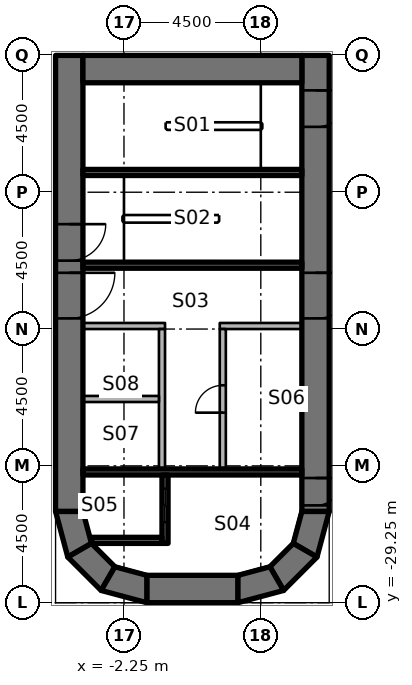
"""IFC4 building model, lengths in metres.
Left out: names, types, materials, properties, quantities, classifications, styles, units other than length and angle.
Written with IfcOpenShell. Run it as: python <this file> out.ifc"""

import sys

from ifc_helpers import new_model, si_unit, direction, frame, frame_2d, origin, place, context, subcontext, project, spatial, polyline, rectangle, outline, extrude, element, fill, save


model = new_model("IFC4")
c1 = context("Model", 3, precision=1e-05, world=origin(), true_north=direction((0.0, 1.0)))
c2 = subcontext(c1, "Body", "Model", "MODEL_VIEW")
j1 = project(units=[si_unit("LENGTHUNIT", "METRE"), si_unit("PLANEANGLEUNIT", "RADIAN")], contexts=[c1])
p1 = place(None, origin())
s1 = spatial("IfcSite", under=j1, at=p1, CompositionType="ELEMENT")
p2 = place(p1, origin())
s2 = spatial("IfcBuilding", under=s1, at=p2, CompositionType="ELEMENT")
p3 = place(p2, frame((0.0, 0.0, -4.0)))
s3 = spatial("IfcBuildingStorey", under=s2, at=p3, CompositionType="ELEMENT", Elevation=-4.0)
p4 = place(p3, frame((-4.05, -11.25, 0.0), z_axis=(0.0, 0.0, 1.0), x_axis=(0.0, -1.0, 0.0)))
e1 = element("IfcWall", 1, at=p4, inside=s3, PredefinedType="SHEAR", context=c2, shape_type="SweptSolid", body=[
    extrude(rectangle(XDim=15.0, YDim=0.9, at=frame_2d((7.5, 0.0))), origin(), (0.0, 0.0, 1.0), 4.0),
])
p5 = place(p4, frame((7.15, 0.0, 0.0)))
e2 = element("IfcOpeningElement", 2, at=p5, cuts=e1, PredefinedType="OPENING", context=c2, shape_type="SweptSolid", body=[
    extrude(rectangle(XDim=1.5, YDim=2.3, at=frame_2d((0.75, 1.15))), frame((0.0, 0.46, 0.0), z_axis=(0.0, -1.0, 0.0), x_axis=(1.0, 0.0, 0.0)), (0.0, 0.0, 1.0), 0.92),
])
p6 = place(p4, frame((5.55, 0.0, 0.0)))
e3 = element("IfcOpeningElement", 3, at=p6, cuts=e1, PredefinedType="OPENING", context=c2, shape_type="SweptSolid", body=[
    extrude(rectangle(XDim=1.2, YDim=2.1, at=frame_2d((0.6, 1.05))), frame((0.0, 0.46, 0.0), z_axis=(0.0, -1.0, 0.0), x_axis=(1.0, 0.0, 0.0)), (0.0, 0.0, 1.0), 0.92),
])
p7 = place(p3, frame((4.05, -11.25, 0.0), z_axis=(0.0, 0.0, 1.0), x_axis=(0.0, -1.0, 0.0)))
e4 = element("IfcWall", 4, at=p7, inside=s3, PredefinedType="SHEAR", context=c2, shape_type="SweptSolid", body=[
    extrude(rectangle(XDim=15.0, YDim=0.9, at=frame_2d((7.5, 0.0))), origin(), (0.0, 0.0, 1.0), 4.0),
])
p8 = place(p7, frame((7.15, 0.0, 0.0)))
e5 = element("IfcOpeningElement", 5, at=p8, cuts=e4, PredefinedType="OPENING", context=c2, shape_type="SweptSolid", body=[
    extrude(rectangle(XDim=1.5, YDim=2.3, at=frame_2d((0.75, 1.15))), frame((0.0, 0.46, 0.0), z_axis=(0.0, -1.0, 0.0), x_axis=(1.0, 0.0, 0.0)), (0.0, 0.0, 1.0), 0.92),
])
p9 = place(p7, frame((13.9, 0.0, 0.0)))
e6 = element("IfcOpeningElement", 6, at=p9, cuts=e4, PredefinedType="OPENING", context=c2, shape_type="SweptSolid", body=[
    extrude(rectangle(XDim=0.9, YDim=2.1, at=frame_2d((0.45, 1.05))), frame((0.0, 0.46, 0.0), z_axis=(0.0, -1.0, 0.0), x_axis=(1.0, 0.0, 0.0)), (0.0, 0.0, 1.0), 0.92),
])
p10 = place(p7, frame((1.15, 0.0, 0.0)))
e7 = element("IfcOpeningElement", 7, at=p10, cuts=e4, PredefinedType="OPENING", context=c2, shape_type="SweptSolid", body=[
    extrude(rectangle(XDim=1.2, YDim=2.1, at=frame_2d((0.6, 1.05))), frame((0.0, 0.46, 0.0), z_axis=(0.0, -1.0, 0.0), x_axis=(1.0, 0.0, 0.0)), (0.0, 0.0, 1.0), 0.92),
])
p11 = place(p3, frame((-3.6, -11.7, 0.0), z_axis=(0.0, 0.0, 1.0), x_axis=(1.0, 0.0, 0.0)))
e8 = element("IfcWall", 8, at=p11, inside=s3, PredefinedType="SHEAR", context=c2, shape_type="SweptSolid", body=[
    extrude(rectangle(XDim=7.2, YDim=0.9, at=frame_2d((3.6, 0.0))), origin(), (0.0, 0.0, 1.0), 4.0),
])
p12 = place(p3, frame((-1.5, -28.8, 0.0), z_axis=(0.0, 0.0, 1.0), x_axis=(1.0, 0.0, 0.0)))
e9 = element("IfcWall", 9, at=p12, inside=s3, PredefinedType="SHEAR", context=c2, shape_type="SweptSolid", body=[
    extrude(rectangle(XDim=3.0, YDim=0.9, at=frame_2d((1.5, 0.0))), origin(), (0.0, 0.0, 1.0), 4.0),
])
p13 = place(p3, origin())
e10 = element("IfcWall", 10, at=p13, inside=s3, PredefinedType="SHEAR", context=c2, shape_type="SweptSolid", body=[
    extrude(outline(polyline([(-4.5, -26.25), (-4.098, -27.75), (-3.319, -27.3), (-3.6, -26.25), (-4.5, -26.25)])), origin(), (0.0, 0.0, 1.0), 4.0),
])
p14 = place(p3, origin())
e11 = element("IfcWall", 11, at=p14, inside=s3, PredefinedType="SHEAR", context=c2, shape_type="SweptSolid", body=[
    extrude(outline(polyline([(-4.098, -27.75), (-3.0, -28.848), (-2.55, -28.069), (-3.319, -27.3), (-4.098, -27.75)])), origin(), (0.0, 0.0, 1.0), 4.0),
])
p15 = place(p3, origin())
e12 = element("IfcWall", 12, at=p15, inside=s3, PredefinedType="SHEAR", context=c2, shape_type="SweptSolid", body=[
    extrude(outline(polyline([(-3.0, -28.848), (-1.5, -29.25), (-1.5, -28.35), (-2.55, -28.069), (-3.0, -28.848)])), origin(), (0.0, 0.0, 1.0), 4.0),
])
p16 = place(p3, origin())
e13 = element("IfcWall", 13, at=p16, inside=s3, PredefinedType="SHEAR", context=c2, shape_type="SweptSolid", body=[
    extrude(outline(polyline([(4.5, -26.25), (4.098, -27.75), (3.319, -27.3), (3.6, -26.25), (4.5, -26.25)])), origin(), (0.0, 0.0, 1.0), 4.0),
])
p17 = place(p3, origin())
e14 = element("IfcWall", 14, at=p17, inside=s3, PredefinedType="SHEAR", context=c2, shape_type="SweptSolid", body=[
    extrude(outline(polyline([(4.098, -27.75), (3.0, -28.848), (2.55, -28.069), (3.319, -27.3), (4.098, -27.75)])), origin(), (0.0, 0.0, 1.0), 4.0),
])
p18 = place(p3, origin())
e15 = element("IfcWall", 15, at=p18, inside=s3, PredefinedType="SHEAR", context=c2, shape_type="SweptSolid", body=[
    extrude(outline(polyline([(3.0, -28.848), (1.5, -29.25), (1.5, -28.35), (2.55, -28.069), (3.0, -28.848)])), origin(), (0.0, 0.0, 1.0), 4.0),
])
p19 = place(p3, frame((3.6, -24.95, 0.0), z_axis=(0.0, 0.0, 1.0), x_axis=(-1.0, 0.0, 0.0)))
e16 = element("IfcWall", 16, at=p19, inside=s3, PredefinedType="SHEAR", context=c2, shape_type="SweptSolid", body=[
    extrude(rectangle(XDim=7.2, YDim=0.2, at=frame_2d((3.6, 0.0))), origin(), (0.0, 0.0, 1.0), 3.1),
])
p20 = place(p3, frame((-0.9, -27.3, 0.0), z_axis=(0.0, 0.0, 1.0), x_axis=(0.0, 1.0, 0.0)))
e17 = element("IfcWall", 17, at=p20, inside=s3, PredefinedType="SHEAR", context=c2, shape_type="SweptSolid", body=[
    extrude(rectangle(XDim=2.25, YDim=0.2, at=frame_2d((1.125, 0.0))), origin(), (0.0, 0.0, 1.0), 3.1),
])
p21 = place(p20, frame((0.7, 0.0, 0.0)))
e18 = element("IfcOpeningElement", 18, at=p21, cuts=e17, PredefinedType="OPENING", context=c2, shape_type="SweptSolid", body=[
    extrude(rectangle(XDim=1.1, YDim=2.3, at=frame_2d((0.55, 1.15))), frame((0.0, 0.11, 0.0), z_axis=(0.0, -1.0, 0.0), x_axis=(1.0, 0.0, 0.0)), (0.0, 0.0, 1.0), 0.22),
])
p22 = place(p3, origin())
e19 = element("IfcWall", 19, at=p22, inside=s3, PredefinedType="SHEAR", context=c2, shape_type="SweptSolid", body=[
    extrude(outline(polyline([(-1.0, -27.1), (-3.341, -27.1), (-3.291, -27.284), (-3.275, -27.3), (-1.0, -27.3), (-1.0, -27.1)])), origin(), (0.0, 0.0, 1.0), 3.1),
])
for number, where, z_axis, x_axis in (
    (20, (3.6, -18.15, 0.0), (0.0, 0.0, 1.0), (-1.0, 0.0, 0.0)),
    (21, (3.6, -15.1, 0.0), (0.0, 0.0, 1.0), (-1.0, 0.0, 0.0)),
):
    element("IfcWall", number, at=place(p3, frame(where, z_axis=z_axis, x_axis=x_axis)), inside=s3, PredefinedType="SHEAR", context=c2, shape_type="SweptSolid", body=[
        extrude(rectangle(XDim=7.2, YDim=0.2, at=frame_2d((3.6, 0.0))), origin(), (0.0, 0.0, 1.0), 3.1),
    ])
p23 = place(p3, frame((3.6, -20.15, 0.0), z_axis=(0.0, 0.0, 1.0), x_axis=(-1.0, 0.0, 0.0)))
e22 = element("IfcWall", 22, at=p23, inside=s3, PredefinedType="PARTITIONING", context=c2, shape_type="SweptSolid", body=[
    extrude(rectangle(XDim=2.7, YDim=0.2, at=frame_2d((1.35, 0.0))), origin(), (0.0, 0.0, 1.0), 3.1),
])
p24 = place(p3, frame((1.0, -24.85, 0.0), z_axis=(0.0, 0.0, 1.0), x_axis=(0.0, 1.0, 0.0)))
e23 = element("IfcWall", 23, at=p24, inside=s3, PredefinedType="PARTITIONING", context=c2, shape_type="SweptSolid", body=[
    extrude(rectangle(XDim=4.6, YDim=0.2, at=frame_2d((2.3, 0.0))), origin(), (0.0, 0.0, 1.0), 3.1),
])
p25 = place(p24, frame((1.85, 0.0, 0.0)))
e24 = element("IfcOpeningElement", 24, at=p25, cuts=e23, PredefinedType="OPENING", context=c2, shape_type="SweptSolid", body=[
    extrude(rectangle(XDim=0.9, YDim=2.1, at=frame_2d((0.45, 1.05))), frame((0.0, 0.11, 0.0), z_axis=(0.0, -1.0, 0.0), x_axis=(1.0, 0.0, 0.0)), (0.0, 0.0, 1.0), 0.22),
])
p26 = place(p3, frame((-0.9, -20.15, 0.0), z_axis=(0.0, 0.0, 1.0), x_axis=(-1.0, 0.0, 0.0)))
e25 = element("IfcWall", 25, at=p26, inside=s3, PredefinedType="PARTITIONING", context=c2, shape_type="SweptSolid", body=[
    extrude(rectangle(XDim=2.7, YDim=0.2, at=frame_2d((1.35, 0.0))), origin(), (0.0, 0.0, 1.0), 3.1),
])
p27 = place(p3, frame((-1.0, -24.85, 0.0), z_axis=(0.0, 0.0, 1.0), x_axis=(0.0, 1.0, 0.0)))
e26 = element("IfcWall", 26, at=p27, inside=s3, PredefinedType="PARTITIONING", context=c2, shape_type="SweptSolid", body=[
    extrude(rectangle(XDim=4.6, YDim=0.2, at=frame_2d((2.3, 0.0))), origin(), (0.0, 0.0, 1.0), 3.1),
])
p28 = place(p3, frame((-1.1, -22.55, 0.0), z_axis=(0.0, 0.0, 1.0), x_axis=(-1.0, 0.0, 0.0)))
e27 = element("IfcWall", 27, at=p28, inside=s3, PredefinedType="PARTITIONING", context=c2, shape_type="SweptSolid", body=[
    extrude(rectangle(XDim=2.5, YDim=0.2, at=frame_2d((1.25, 0.0))), origin(), (0.0, 0.0, 1.0), 3.1),
])
p29 = place(p8, origin())
e28 = element("IfcDoor", 28, at=p29, inside=s3, OperationType="DOUBLE_DOOR_SINGLE_SWING", PredefinedType="DOOR", context=c2, shape_type="SweptSolid", body=[
    extrude(rectangle(XDim=1.5, YDim=2.3, at=frame_2d((0.75, 1.15))), frame((0.0, 0.025, 0.0), z_axis=(0.0, -1.0, 0.0), x_axis=(1.0, 0.0, 0.0)), (0.0, 0.0, 1.0), 0.05),
])
fill(e5, e28)
p30 = place(p5, origin())
e29 = element("IfcDoor", 29, at=p30, inside=s3, OperationType="DOUBLE_DOOR_SINGLE_SWING", PredefinedType="DOOR", context=c2, shape_type="SweptSolid", body=[
    extrude(rectangle(XDim=1.5, YDim=2.3, at=frame_2d((0.75, 1.15))), frame((0.0, 0.025, 0.0), z_axis=(0.0, -1.0, 0.0), x_axis=(1.0, 0.0, 0.0)), (0.0, 0.0, 1.0), 0.05),
])
fill(e2, e29)
p31 = place(p9, origin())
e30 = element("IfcDoor", 30, at=p31, inside=s3, OperationType="SINGLE_SWING_LEFT", PredefinedType="DOOR", context=c2, shape_type="SweptSolid", body=[
    extrude(rectangle(XDim=0.9, YDim=2.1, at=frame_2d((0.45, 1.05))), frame((0.0, 0.025, 0.0), z_axis=(0.0, -1.0, 0.0), x_axis=(1.0, 0.0, 0.0)), (0.0, 0.0, 1.0), 0.05),
])
fill(e6, e30)
p32 = place(p6, origin())
e31 = element("IfcDoor", 31, at=p32, inside=s3, OperationType="SINGLE_SWING_LEFT", PredefinedType="DOOR", context=c2, shape_type="SweptSolid", body=[
    extrude(rectangle(XDim=1.2, YDim=2.1, at=frame_2d((0.6, 1.05))), frame((0.0, 0.025, 0.0), z_axis=(0.0, -1.0, 0.0), x_axis=(1.0, 0.0, 0.0)), (0.0, 0.0, 1.0), 0.05),
])
fill(e3, e31)
p33 = place(p10, origin())
e32 = element("IfcDoor", 32, at=p33, inside=s3, OperationType="SINGLE_SWING_LEFT", PredefinedType="DOOR", context=c2, shape_type="SweptSolid", body=[
    extrude(rectangle(XDim=1.2, YDim=2.1, at=frame_2d((0.6, 1.05))), frame((0.0, 0.025, 0.0), z_axis=(0.0, -1.0, 0.0), x_axis=(1.0, 0.0, 0.0)), (0.0, 0.0, 1.0), 0.05),
])
fill(e7, e32)
p34 = place(p21, origin())
e33 = element("IfcDoor", 33, at=p34, inside=s3, OperationType="DOUBLE_DOOR_SLIDING", PredefinedType="DOOR", context=c2, shape_type="SweptSolid", body=[
    extrude(rectangle(XDim=1.1, YDim=2.3, at=frame_2d((0.55, 1.15))), frame((0.0, 0.025, 0.0), z_axis=(0.0, -1.0, 0.0), x_axis=(1.0, 0.0, 0.0)), (0.0, 0.0, 1.0), 0.05),
])
fill(e18, e33)
p35 = place(p25, origin())
e34 = element("IfcDoor", 34, at=p35, inside=s3, OperationType="SINGLE_SWING_LEFT", PredefinedType="DOOR", context=c2, shape_type="SweptSolid", body=[
    extrude(rectangle(XDim=0.9, YDim=2.1, at=frame_2d((0.45, 1.05))), frame((0.0, 0.025, 0.0), z_axis=(0.0, -1.0, 0.0), x_axis=(1.0, 0.0, 0.0)), (0.0, 0.0, 1.0), 0.05),
])
fill(e24, e34)
save(model, sys.argv[1])
